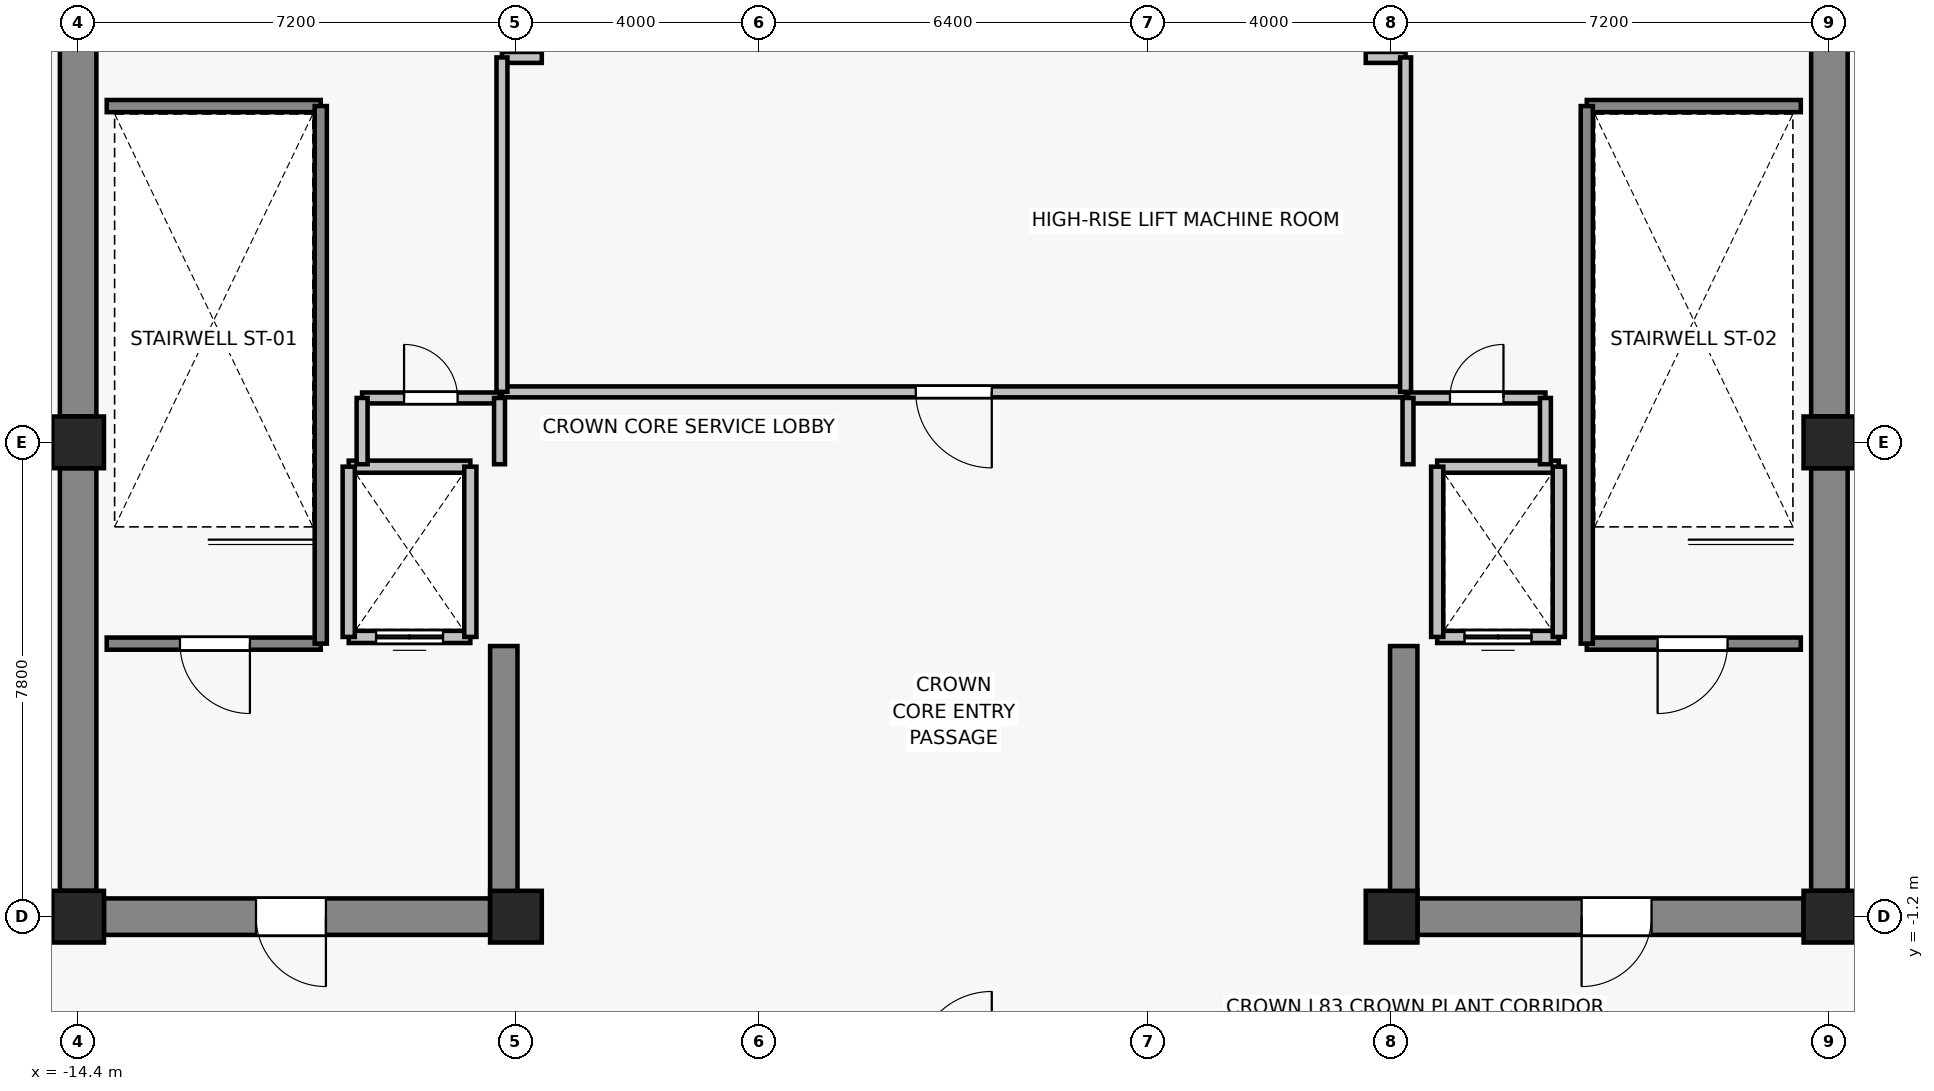
"""IFC4 building model, lengths in metres.
Left out: names, types, materials, properties, quantities, classifications, styles, units other than length and angle.
Written with IfcOpenShell. Run it as: python <this file> out.ifc"""

import sys

from ifc_helpers import new_model, si_unit, direction, frame, frame_2d, origin, origin_2d, place, context, subcontext, project, spatial, rectangle, extrude, source, transform, mapped, element, fill, save


model = new_model("IFC4")
c1 = context("Model", 3, precision=1e-05, world=origin(), true_north=direction((0.0, 1.0)))
c2 = subcontext(c1, "Body", "Model", "MODEL_VIEW")
j1 = project(units=[si_unit("LENGTHUNIT", "METRE"), si_unit("PLANEANGLEUNIT", "RADIAN")], contexts=[c1])
p1 = place(None, origin())
s1 = spatial("IfcSite", under=j1, at=p1, CompositionType="ELEMENT")
p2 = place(p1, origin())
s2 = spatial("IfcBuilding", under=s1, at=p2, CompositionType="ELEMENT")
p3 = place(p2, frame((0.0, 0.0, 294.6)))
s3 = spatial("IfcBuildingStorey", under=s2, at=p3, CompositionType="ELEMENT", Elevation=294.6)
for number, where, z_axis, x_axis in (
    (1, (-14.4, -1.2, 0.0), (0.0, 0.0, 1.0), (1.0, 0.0, 0.0)),
    (2, (-7.2, -1.2, 0.0), (0.0, 0.0, 1.0), (1.0, 0.0, 0.0)),
    (3, (7.2, -1.2, 0.0), (0.0, 0.0, 1.0), (1.0, 0.0, 0.0)),
    (4, (14.4, -1.2, 0.0), (0.0, 0.0, 1.0), (1.0, 0.0, 0.0)),
    (5, (-14.4, 6.6, 0.0), (0.0, 0.0, 1.0), (1.0, 0.0, 0.0)),
    (6, (14.4, 6.6, 0.0), (0.0, 0.0, 1.0), (1.0, 0.0, 0.0)),
):
    element("IfcColumn", number, at=place(p3, frame(where, z_axis=z_axis, x_axis=x_axis)), inside=s3, PredefinedType="COLUMN", context=c2, shape_type="SweptSolid", body=[
        extrude(rectangle(XDim=0.85, YDim=0.85, at=origin_2d()), origin(), (0.0, 0.0, 1.0), 4.6),
    ])
p4 = place(p3, frame((-14.4, -0.775, 0.0), z_axis=(0.0, 0.0, 1.0), x_axis=(0.0, 1.0, 0.0)))
e7 = element("IfcWall", 7, at=p4, inside=s3, PredefinedType="SHEAR", context=c2, shape_type="SweptSolid", body=[
    extrude(rectangle(XDim=6.95, YDim=0.6, at=frame_2d((3.475, 0.0))), origin(), (0.0, 0.0, 1.0), 4.38),
])
p5 = place(p3, frame((-14.4, 7.025, 0.0), z_axis=(0.0, 0.0, 1.0), x_axis=(0.0, 1.0, 0.0)))
e8 = element("IfcWall", 8, at=p5, inside=s3, PredefinedType="SHEAR", context=c2, shape_type="SweptSolid", body=[
    extrude(rectangle(XDim=6.05, YDim=0.6, at=frame_2d((3.025, 0.0))), origin(), (0.0, 0.0, 1.0), 4.38),
])
p6 = place(p3, frame((14.4, -0.775, 0.0), z_axis=(0.0, 0.0, 1.0), x_axis=(0.0, 1.0, 0.0)))
e9 = element("IfcWall", 9, at=p6, inside=s3, PredefinedType="SHEAR", context=c2, shape_type="SweptSolid", body=[
    extrude(rectangle(XDim=6.95, YDim=0.6, at=frame_2d((3.475, 0.0))), origin(), (0.0, 0.0, 1.0), 4.38),
])
p7 = place(p3, frame((14.4, 7.025, 0.0), z_axis=(0.0, 0.0, 1.0), x_axis=(0.0, 1.0, 0.0)))
e10 = element("IfcWall", 10, at=p7, inside=s3, PredefinedType="SHEAR", context=c2, shape_type="SweptSolid", body=[
    extrude(rectangle(XDim=6.05, YDim=0.6, at=frame_2d((3.025, 0.0))), origin(), (0.0, 0.0, 1.0), 4.38),
])
p8 = place(p3, frame((-7.625, -1.2, 0.0), z_axis=(0.0, 0.0, 1.0), x_axis=(-1.0, 0.0, 0.0)))
e11 = element("IfcWall", 11, at=p8, inside=s3, PredefinedType="SHEAR", context=c2, shape_type="SweptSolid", body=[
    extrude(rectangle(XDim=6.35, YDim=0.6, at=frame_2d((3.175, 0.0))), origin(), (0.0, 0.0, 1.0), 4.38),
])
p9 = place(p8, frame((2.7, 0.0, 0.0)))
e12 = element("IfcOpeningElement", 12, at=p9, cuts=e11, PredefinedType="OPENING", context=c2, shape_type="SweptSolid", body=[
    extrude(rectangle(XDim=1.15, YDim=2.15, at=frame_2d((0.575, 1.075))), frame((0.0, 0.31, 0.0), z_axis=(0.0, -1.0, 0.0), x_axis=(1.0, 0.0, 0.0)), (0.0, 0.0, 1.0), 0.62),
])
p10 = place(p3, frame((13.975, -1.2, 0.0), z_axis=(0.0, 0.0, 1.0), x_axis=(-1.0, 0.0, 0.0)))
e13 = element("IfcWall", 13, at=p10, inside=s3, PredefinedType="SHEAR", context=c2, shape_type="SweptSolid", body=[
    extrude(rectangle(XDim=6.35, YDim=0.6, at=frame_2d((3.175, 0.0))), origin(), (0.0, 0.0, 1.0), 4.38),
])
p11 = place(p10, frame((2.5, 0.0, 0.0)))
e14 = element("IfcOpeningElement", 14, at=p11, cuts=e13, PredefinedType="OPENING", context=c2, shape_type="SweptSolid", body=[
    extrude(rectangle(XDim=1.15, YDim=2.15, at=frame_2d((0.575, 1.075))), frame((0.0, 0.31, 0.0), z_axis=(0.0, -1.0, 0.0), x_axis=(1.0, 0.0, 0.0)), (0.0, 0.0, 1.0), 0.62),
])
for number, where, z_axis, x_axis in (
    (15, (-7.4, -0.9, 0.0), (0.0, 0.0, 1.0), (0.0, 1.0, 0.0)),
    (16, (7.4, -0.9, 0.0), (0.0, 0.0, 1.0), (0.0, 1.0, 0.0)),
):
    element("IfcWall", number, at=place(p3, frame(where, z_axis=z_axis, x_axis=x_axis)), inside=s3, PredefinedType="SHEAR", context=c2, shape_type="SweptSolid", body=[
        extrude(rectangle(XDim=4.15, YDim=0.45, at=frame_2d((2.075, 0.0))), origin(), (0.0, 0.0, 1.0), 4.38),
    ])
p12 = place(p3, frame((-7.95, 3.4, 0.0), z_axis=(0.0, 0.0, 1.0), x_axis=(-1.0, 0.0, 0.0)))
e17 = element("IfcWall", 17, at=p12, inside=s3, PredefinedType="SOLIDWALL", context=c2, shape_type="SweptSolid", body=[
    extrude(rectangle(XDim=2.0, YDim=0.2, at=frame_2d((1.0, 0.0))), origin(), (0.0, 0.0, 1.0), 4.38),
])
p13 = place(p12, frame((0.45, 0.0, 0.0)))
e18 = element("IfcOpeningElement", 18, at=p13, cuts=e17, PredefinedType="OPENING", context=c2, shape_type="SweptSolid", body=[
    extrude(rectangle(XDim=1.1, YDim=2.2, at=frame_2d((0.55, 1.1))), frame((0.0, 0.11, 0.0), z_axis=(0.0, -1.0, 0.0), x_axis=(1.0, 0.0, 0.0)), (0.0, 0.0, 1.0), 0.22),
])
p14 = place(p3, frame((-9.95, 6.2, 0.0), z_axis=(0.0, 0.0, 1.0), x_axis=(1.0, 0.0, 0.0)))
e19 = element("IfcWall", 19, at=p14, inside=s3, PredefinedType="SOLIDWALL", context=c2, shape_type="SweptSolid", body=[
    extrude(rectangle(XDim=2.0, YDim=0.2, at=frame_2d((1.0, 0.0))), origin(), (0.0, 0.0, 1.0), 4.38),
])
for number, where, z_axis, x_axis in (
    (20, (-9.95, 3.4, 0.0), (0.0, 0.0, 1.0), (0.0, 1.0, 0.0)),
    (21, (-7.95, 6.2, 0.0), (0.0, 0.0, 1.0), (0.0, -1.0, 0.0)),
):
    element("IfcWall", number, at=place(p3, frame(where, z_axis=z_axis, x_axis=x_axis)), inside=s3, PredefinedType="SOLIDWALL", context=c2, shape_type="SweptSolid", body=[
        extrude(rectangle(XDim=2.8, YDim=0.2, at=frame_2d((1.4, 0.0))), origin(), (0.0, 0.0, 1.0), 4.38),
    ])
p15 = place(p3, frame((9.95, 3.4, 0.0), z_axis=(0.0, 0.0, 1.0), x_axis=(-1.0, 0.0, 0.0)))
e22 = element("IfcWall", 22, at=p15, inside=s3, PredefinedType="SOLIDWALL", context=c2, shape_type="SweptSolid", body=[
    extrude(rectangle(XDim=2.0, YDim=0.2, at=frame_2d((1.0, 0.0))), origin(), (0.0, 0.0, 1.0), 4.38),
])
p16 = place(p15, frame((0.45, 0.0, 0.0)))
e23 = element("IfcOpeningElement", 23, at=p16, cuts=e22, PredefinedType="OPENING", context=c2, shape_type="SweptSolid", body=[
    extrude(rectangle(XDim=1.1, YDim=2.2, at=frame_2d((0.55, 1.1))), frame((0.0, 0.11, 0.0), z_axis=(0.0, -1.0, 0.0), x_axis=(1.0, 0.0, 0.0)), (0.0, 0.0, 1.0), 0.22),
])
p17 = place(p3, frame((7.95, 6.2, 0.0), z_axis=(0.0, 0.0, 1.0), x_axis=(1.0, 0.0, 0.0)))
e24 = element("IfcWall", 24, at=p17, inside=s3, PredefinedType="SOLIDWALL", context=c2, shape_type="SweptSolid", body=[
    extrude(rectangle(XDim=2.0, YDim=0.2, at=frame_2d((1.0, 0.0))), origin(), (0.0, 0.0, 1.0), 4.38),
])
for number, where, z_axis, x_axis in (
    (25, (7.95, 3.4, 0.0), (0.0, 0.0, 1.0), (0.0, 1.0, 0.0)),
    (26, (9.95, 6.2, 0.0), (0.0, 0.0, 1.0), (0.0, -1.0, 0.0)),
):
    element("IfcWall", number, at=place(p3, frame(where, z_axis=z_axis, x_axis=x_axis)), inside=s3, PredefinedType="SOLIDWALL", context=c2, shape_type="SweptSolid", body=[
        extrude(rectangle(XDim=2.8, YDim=0.2, at=frame_2d((1.4, 0.0))), origin(), (0.0, 0.0, 1.0), 4.38),
    ])
p18 = place(p3, frame((-10.41, 3.29, 0.0), z_axis=(0.0, 0.0, 1.0), x_axis=(-1.0, 0.0, 0.0)))
e27 = element("IfcWall", 27, at=p18, inside=s3, PredefinedType="SOLIDWALL", context=c2, shape_type="SweptSolid", body=[
    extrude(rectangle(XDim=3.52, YDim=0.2, at=frame_2d((1.76, 0.0))), origin(), (0.0, 0.0, 1.0), 4.38),
])
p19 = place(p18, frame((1.165, 0.0, 0.0)))
e28 = element("IfcOpeningElement", 28, at=p19, cuts=e27, PredefinedType="OPENING", context=c2, shape_type="SweptSolid", body=[
    extrude(rectangle(XDim=1.15, YDim=2.15, at=frame_2d((0.575, 1.075))), frame((0.0, 0.11, 0.0), z_axis=(0.0, -1.0, 0.0), x_axis=(1.0, 0.0, 0.0)), (0.0, 0.0, 1.0), 0.22),
])
p20 = place(p3, frame((-13.93, 12.13, 0.0), z_axis=(0.0, 0.0, 1.0), x_axis=(1.0, 0.0, 0.0)))
e29 = element("IfcWall", 29, at=p20, inside=s3, PredefinedType="SOLIDWALL", context=c2, shape_type="SweptSolid", body=[
    extrude(rectangle(XDim=3.52, YDim=0.2, at=frame_2d((1.76, 0.0))), origin(), (0.0, 0.0, 1.0), 4.38),
])
p21 = place(p3, frame((-10.41, 12.13, 0.0), z_axis=(0.0, 0.0, 1.0), x_axis=(0.0, -1.0, 0.0)))
e30 = element("IfcWall", 30, at=p21, inside=s3, PredefinedType="SOLIDWALL", context=c2, shape_type="SweptSolid", body=[
    extrude(rectangle(XDim=8.84, YDim=0.2, at=frame_2d((4.42, 0.0))), origin(), (0.0, 0.0, 1.0), 4.38),
])
p22 = place(p3, frame((13.93, 3.29, 0.0), z_axis=(0.0, 0.0, 1.0), x_axis=(-1.0, 0.0, 0.0)))
e31 = element("IfcWall", 31, at=p22, inside=s3, PredefinedType="SOLIDWALL", context=c2, shape_type="SweptSolid", body=[
    extrude(rectangle(XDim=3.52, YDim=0.2, at=frame_2d((1.76, 0.0))), origin(), (0.0, 0.0, 1.0), 4.38),
])
p23 = place(p22, frame((1.205, 0.0, 0.0)))
e32 = element("IfcOpeningElement", 32, at=p23, cuts=e31, PredefinedType="OPENING", context=c2, shape_type="SweptSolid", body=[
    extrude(rectangle(XDim=1.15, YDim=2.15, at=frame_2d((0.575, 1.075))), frame((0.0, 0.11, 0.0), z_axis=(0.0, -1.0, 0.0), x_axis=(1.0, 0.0, 0.0)), (0.0, 0.0, 1.0), 0.22),
])
p24 = place(p3, frame((10.41, 12.13, 0.0), z_axis=(0.0, 0.0, 1.0), x_axis=(1.0, 0.0, 0.0)))
e33 = element("IfcWall", 33, at=p24, inside=s3, PredefinedType="SOLIDWALL", context=c2, shape_type="SweptSolid", body=[
    extrude(rectangle(XDim=3.52, YDim=0.2, at=frame_2d((1.76, 0.0))), origin(), (0.0, 0.0, 1.0), 4.38),
])
p25 = place(p3, frame((10.41, 3.29, 0.0), z_axis=(0.0, 0.0, 1.0), x_axis=(0.0, 1.0, 0.0)))
e34 = element("IfcWall", 34, at=p25, inside=s3, PredefinedType="SOLIDWALL", context=c2, shape_type="SweptSolid", body=[
    extrude(rectangle(XDim=8.84, YDim=0.2, at=frame_2d((4.42, 0.0))), origin(), (0.0, 0.0, 1.0), 4.38),
])
p26 = place(p3, frame((7.43, 7.43, 0.0), z_axis=(0.0, 0.0, 1.0), x_axis=(-1.0, 0.0, 0.0)))
e35 = element("IfcWall", 35, at=p26, inside=s3, PredefinedType="PARTITIONING", context=c2, shape_type="SweptSolid", body=[
    extrude(rectangle(XDim=14.86, YDim=0.18, at=frame_2d((7.43, 0.0))), origin(), (0.0, 0.0, 1.0), 3.77),
])
p27 = place(p26, frame((6.805, 0.0, 0.0)))
e36 = element("IfcOpeningElement", 36, at=p27, cuts=e35, PredefinedType="OPENING", context=c2, shape_type="SweptSolid", body=[
    extrude(rectangle(XDim=1.25, YDim=2.15, at=frame_2d((0.625, 1.075))), frame((0.0, 0.1, 0.0), z_axis=(0.0, -1.0, 0.0), x_axis=(1.0, 0.0, 0.0)), (0.0, 0.0, 1.0), 0.2),
])
for number, where, z_axis, x_axis in (
    (37, (-7.43, 12.93, 0.0), (0.0, 0.0, 1.0), (1.0, 0.0, 0.0)),
    (38, (6.775, 12.93, 0.0), (0.0, 0.0, 1.0), (1.0, 0.0, 0.0)),
):
    element("IfcWall", number, at=place(p3, frame(where, z_axis=z_axis, x_axis=x_axis)), inside=s3, PredefinedType="PARTITIONING", context=c2, shape_type="SweptSolid", body=[
        extrude(rectangle(XDim=0.655, YDim=0.18, at=frame_2d((0.328, 0.0))), origin(), (0.0, 0.0, 1.0), 3.77),
    ])
for number, where, z_axis, x_axis in (
    (39, (-7.43, 7.43, 0.0), (0.0, 0.0, 1.0), (0.0, 1.0, 0.0)),
    (40, (7.43, 12.93, 0.0), (0.0, 0.0, 1.0), (0.0, -1.0, 0.0)),
):
    element("IfcWall", number, at=place(p3, frame(where, z_axis=z_axis, x_axis=x_axis)), inside=s3, PredefinedType="PARTITIONING", context=c2, shape_type="SweptSolid", body=[
        extrude(rectangle(XDim=5.5, YDim=0.18, at=frame_2d((2.75, 0.0))), origin(), (0.0, 0.0, 1.0), 3.77),
    ])
p28 = place(p3, frame((-9.73, 7.33, 0.0), z_axis=(0.0, 0.0, 1.0), x_axis=(1.0, 0.0, 0.0)))
e41 = element("IfcWall", 41, at=p28, inside=s3, PredefinedType="PARTITIONING", context=c2, shape_type="SweptSolid", body=[
    extrude(rectangle(XDim=2.26, YDim=0.18, at=frame_2d((1.13, 0.0))), origin(), (0.0, 0.0, 1.0), 3.77),
])
p29 = place(p28, frame((0.69, 0.0, 0.0)))
e42 = element("IfcOpeningElement", 42, at=p29, cuts=e41, PredefinedType="OPENING", context=c2, shape_type="SweptSolid", body=[
    extrude(rectangle(XDim=0.88, YDim=2.1, at=frame_2d((0.44, 1.05))), frame((0.0, 0.1, 0.0), z_axis=(0.0, -1.0, 0.0), x_axis=(1.0, 0.0, 0.0)), (0.0, 0.0, 1.0), 0.2),
])
p30 = place(p3, frame((-9.73, 6.24, 0.0), z_axis=(0.0, 0.0, 1.0), x_axis=(0.0, 1.0, 0.0)))
e43 = element("IfcWall", 43, at=p30, inside=s3, PredefinedType="PARTITIONING", context=c2, shape_type="SweptSolid", body=[
    extrude(rectangle(XDim=1.09, YDim=0.18, at=frame_2d((0.545, 0.0))), origin(), (0.0, 0.0, 1.0), 4.38),
])
p31 = place(p3, frame((-7.47, 7.33, 0.0), z_axis=(0.0, 0.0, 1.0), x_axis=(0.0, -1.0, 0.0)))
e44 = element("IfcWall", 44, at=p31, inside=s3, PredefinedType="PARTITIONING", context=c2, shape_type="SweptSolid", body=[
    extrude(rectangle(XDim=1.09, YDim=0.18, at=frame_2d((0.545, 0.0))), origin(), (0.0, 0.0, 1.0), 3.77),
])
p32 = place(p3, frame((7.47, 7.33, 0.0), z_axis=(0.0, 0.0, 1.0), x_axis=(1.0, 0.0, 0.0)))
e45 = element("IfcWall", 45, at=p32, inside=s3, PredefinedType="PARTITIONING", context=c2, shape_type="SweptSolid", body=[
    extrude(rectangle(XDim=2.26, YDim=0.18, at=frame_2d((1.13, 0.0))), origin(), (0.0, 0.0, 1.0), 3.77),
])
p33 = place(p32, frame((0.69, 0.0, 0.0)))
e46 = element("IfcOpeningElement", 46, at=p33, cuts=e45, PredefinedType="OPENING", context=c2, shape_type="SweptSolid", body=[
    extrude(rectangle(XDim=0.88, YDim=2.1, at=frame_2d((0.44, 1.05))), frame((0.0, 0.1, 0.0), z_axis=(0.0, -1.0, 0.0), x_axis=(1.0, 0.0, 0.0)), (0.0, 0.0, 1.0), 0.2),
])
p34 = place(p3, frame((7.47, 6.24, 0.0), z_axis=(0.0, 0.0, 1.0), x_axis=(0.0, 1.0, 0.0)))
e47 = element("IfcWall", 47, at=p34, inside=s3, PredefinedType="PARTITIONING", context=c2, shape_type="SweptSolid", body=[
    extrude(rectangle(XDim=1.09, YDim=0.18, at=frame_2d((0.545, 0.0))), origin(), (0.0, 0.0, 1.0), 3.77),
])
p35 = place(p3, frame((9.73, 7.33, 0.0), z_axis=(0.0, 0.0, 1.0), x_axis=(0.0, -1.0, 0.0)))
e48 = element("IfcWall", 48, at=p35, inside=s3, PredefinedType="PARTITIONING", context=c2, shape_type="SweptSolid", body=[
    extrude(rectangle(XDim=1.09, YDim=0.18, at=frame_2d((0.545, 0.0))), origin(), (0.0, 0.0, 1.0), 4.38),
])
m1 = source(origin(), c2, "Body", "SweptSolid", [
    extrude(rectangle(XDim=1.1, YDim=2.2, at=frame_2d((0.55, 1.1))), frame((0.0, 0.025, 0.0), z_axis=(0.0, -1.0, 0.0), x_axis=(1.0, 0.0, 0.0)), (0.0, 0.0, 1.0), 0.05),
])
p36 = place(p13, origin())
e49 = element("IfcDoor", 49, at=p36, inside=s3, OperationType="DOUBLE_DOOR_SLIDING", PredefinedType="DOOR", context=c2, shape_type="MappedRepresentation", body=[
    mapped(m1, transform((0.0, 0.0, 0.0), x_axis=(1.0, 0.0, 0.0), y_axis=(0.0, 1.0, 0.0), z_axis=(0.0, 0.0, 1.0), scale=1.0)),
])
fill(e18, e49)
p37 = place(p16, origin())
e50 = element("IfcDoor", 50, at=p37, inside=s3, OperationType="DOUBLE_DOOR_SLIDING", PredefinedType="DOOR", context=c2, shape_type="MappedRepresentation", body=[
    mapped(m1, transform((0.0, 0.0, 0.0), x_axis=(1.0, 0.0, 0.0), y_axis=(0.0, 1.0, 0.0), z_axis=(0.0, 0.0, 1.0), scale=1.0)),
])
fill(e23, e50)
m2 = source(origin(), c2, "Body", "SweptSolid", [
    extrude(rectangle(XDim=1.15, YDim=2.15, at=frame_2d((0.575, 1.075))), frame((0.0, 0.025, 0.0), z_axis=(0.0, -1.0, 0.0), x_axis=(1.0, 0.0, 0.0)), (0.0, 0.0, 1.0), 0.05),
])
p38 = place(p19, origin())
e51 = element("IfcDoor", 51, at=p38, inside=s3, OperationType="SINGLE_SWING_LEFT", PredefinedType="DOOR", context=c2, shape_type="MappedRepresentation", body=[
    mapped(m2, transform((0.0, 0.0, 0.0), x_axis=(1.0, 0.0, 0.0), y_axis=(0.0, 1.0, 0.0), z_axis=(0.0, 0.0, 1.0), scale=1.0)),
])
fill(e28, e51)
p39 = place(p23, origin())
e52 = element("IfcDoor", 52, at=p39, inside=s3, OperationType="SINGLE_SWING_RIGHT", PredefinedType="DOOR", context=c2, shape_type="MappedRepresentation", body=[
    mapped(m2, transform((0.0, 0.0, 0.0), x_axis=(1.0, 0.0, 0.0), y_axis=(0.0, 1.0, 0.0), z_axis=(0.0, 0.0, 1.0), scale=1.0)),
])
fill(e32, e52)
p40 = place(p9, origin())
e53 = element("IfcDoor", 53, at=p40, inside=s3, OperationType="SINGLE_SWING_LEFT", PredefinedType="DOOR", context=c2, shape_type="MappedRepresentation", body=[
    mapped(m2, transform((0.0, 0.0, 0.0), x_axis=(1.0, 0.0, 0.0), y_axis=(0.0, 1.0, 0.0), z_axis=(0.0, 0.0, 1.0), scale=1.0)),
])
fill(e12, e53)
p41 = place(p11, origin())
e54 = element("IfcDoor", 54, at=p41, inside=s3, OperationType="SINGLE_SWING_RIGHT", PredefinedType="DOOR", context=c2, shape_type="MappedRepresentation", body=[
    mapped(m2, transform((0.0, 0.0, 0.0), x_axis=(1.0, 0.0, 0.0), y_axis=(0.0, 1.0, 0.0), z_axis=(0.0, 0.0, 1.0), scale=1.0)),
])
fill(e14, e54)
m3 = source(origin(), c2, "Body", "SweptSolid", [
    extrude(rectangle(XDim=1.25, YDim=2.15, at=frame_2d((0.625, 1.075))), frame((0.0, 0.025, 0.0), z_axis=(0.0, -1.0, 0.0), x_axis=(1.0, 0.0, 0.0)), (0.0, 0.0, 1.0), 0.05),
])
p42 = place(p27, origin())
e55 = element("IfcDoor", 55, at=p42, inside=s3, OperationType="SINGLE_SWING_LEFT", PredefinedType="DOOR", context=c2, shape_type="MappedRepresentation", body=[
    mapped(m3, transform((0.0, 0.0, 0.0), x_axis=(1.0, 0.0, 0.0), y_axis=(0.0, 1.0, 0.0), z_axis=(0.0, 0.0, 1.0), scale=1.0)),
])
fill(e36, e55)
m4 = source(origin(), c2, "Body", "SweptSolid", [
    extrude(rectangle(XDim=0.88, YDim=2.1, at=frame_2d((0.44, 1.05))), frame((0.0, 0.025, 0.0), z_axis=(0.0, -1.0, 0.0), x_axis=(1.0, 0.0, 0.0)), (0.0, 0.0, 1.0), 0.05),
])
p43 = place(p29, origin())
e56 = element("IfcDoor", 56, at=p43, inside=s3, OperationType="SINGLE_SWING_LEFT", PredefinedType="DOOR", context=c2, shape_type="MappedRepresentation", body=[
    mapped(m4, transform((0.0, 0.0, 0.0), x_axis=(1.0, 0.0, 0.0), y_axis=(0.0, 1.0, 0.0), z_axis=(0.0, 0.0, 1.0), scale=1.0)),
])
fill(e42, e56)
p44 = place(p33, origin())
e57 = element("IfcDoor", 57, at=p44, inside=s3, OperationType="SINGLE_SWING_RIGHT", PredefinedType="DOOR", context=c2, shape_type="MappedRepresentation", body=[
    mapped(m4, transform((0.0, 0.0, 0.0), x_axis=(1.0, 0.0, 0.0), y_axis=(0.0, 1.0, 0.0), z_axis=(0.0, 0.0, 1.0), scale=1.0)),
])
fill(e46, e57)
save(model, sys.argv[1])
